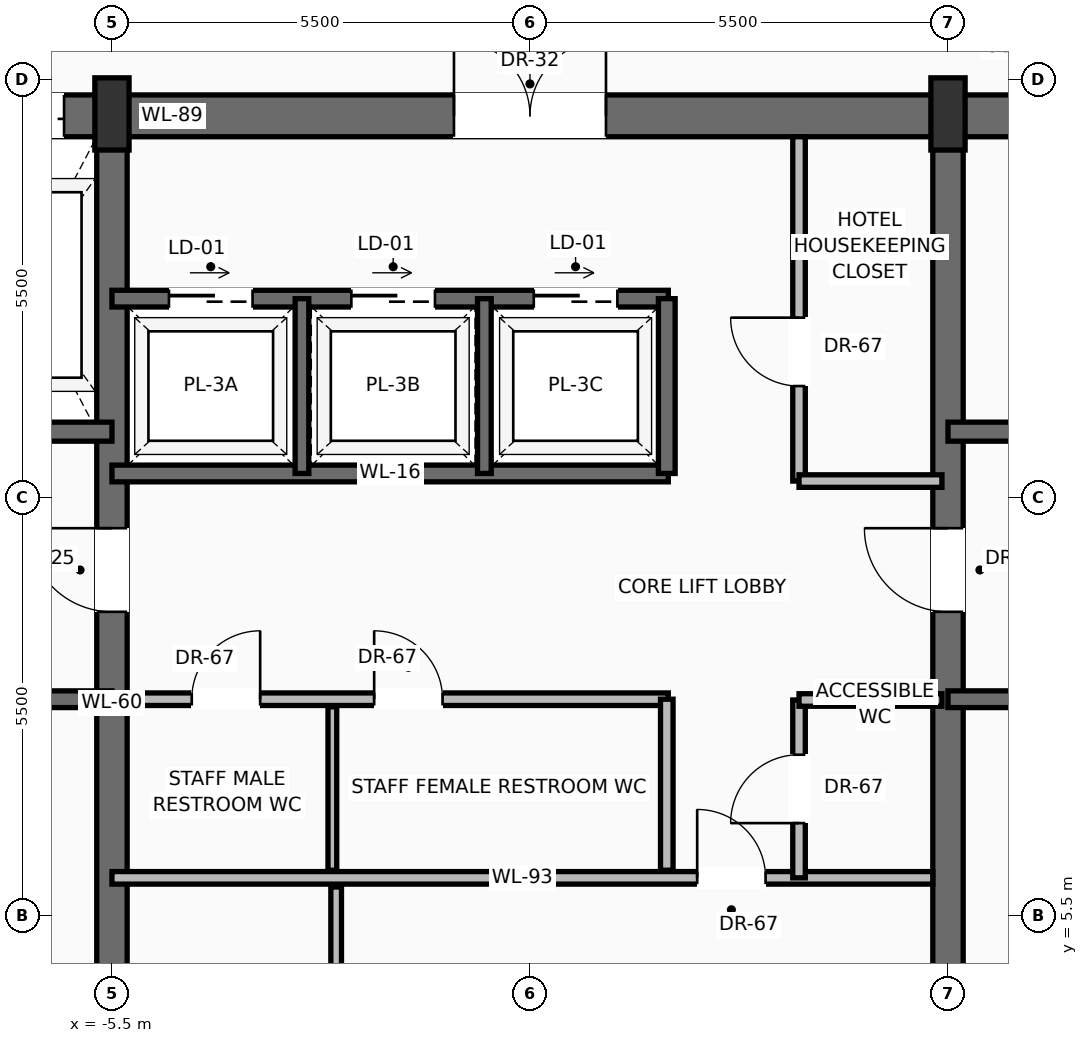
"""IFC4 building model, lengths in metres.
Left out: names, types, materials, properties, quantities, classifications, styles, units other than length and angle.
Written with IfcOpenShell. Run it as: python <this file> out.ifc"""

import sys

from ifc_helpers import new_model, si_unit, direction, frame, frame_2d, origin, origin_2d, place, context, subcontext, project, spatial, rectangle, extrude, source, transform, mapped, element, fill, save


model = new_model("IFC4")
c1 = context("Model", 3, precision=1e-05, world=origin(), true_north=direction((0.0, 1.0)))
c2 = subcontext(c1, "Body", "Model", "MODEL_VIEW")
j1 = project(units=[si_unit("LENGTHUNIT", "METRE"), si_unit("PLANEANGLEUNIT", "RADIAN")], contexts=[c1])
p1 = place(None, origin())
s1 = spatial("IfcSite", under=j1, at=p1, CompositionType="ELEMENT")
p2 = place(p1, origin())
s2 = spatial("IfcBuilding", under=s1, at=p2, CompositionType="ELEMENT")
p3 = place(p2, frame((0.0, 0.0, 233.8)))
s3 = spatial("IfcBuildingStorey", under=s2, at=p3, CompositionType="ELEMENT", Elevation=233.8)
p4 = place(p3, frame((-10.7, 16.025, 0.0), z_axis=(0.0, 0.0, 1.0), x_axis=(1.0, 0.0, 0.0)))
e1 = element("IfcWall", 1, at=p4, inside=s3, PredefinedType="SHEAR", context=c2, shape_type="SweptSolid", body=[
    extrude(rectangle(XDim=21.4, YDim=0.55, at=frame_2d((10.7, 0.0))), origin(), (0.0, 0.0, 1.0), 3.24),
])
p5 = place(p4, frame((3.27, 0.0, 0.0)))
e2 = element("IfcOpeningElement", 2, at=p5, cuts=e1, PredefinedType="OPENING", context=c2, shape_type="SweptSolid", body=[
    extrude(rectangle(XDim=1.3, YDim=2.3, at=frame_2d((0.65, 1.15))), frame((0.0, 0.285, 0.0), z_axis=(0.0, -1.0, 0.0), x_axis=(1.0, 0.0, 0.0)), (0.0, 0.0, 1.0), 0.57),
])
p6 = place(p4, frame((9.7, 0.0, 0.0)))
e3 = element("IfcOpeningElement", 3, at=p6, cuts=e1, PredefinedType="OPENING", context=c2, shape_type="SweptSolid", body=[
    extrude(rectangle(XDim=2.0, YDim=2.4, at=frame_2d((1.0, 1.2))), frame((0.0, 0.285, 0.0), z_axis=(0.0, -1.0, 0.0), x_axis=(1.0, 0.0, 0.0)), (0.0, 0.0, 1.0), 0.57),
])
p7 = place(p3, frame((-5.5, 0.575, 0.0), z_axis=(0.0, 0.0, 1.0), x_axis=(0.0, 1.0, 0.0)))
e4 = element("IfcWall", 4, at=p7, inside=s3, PredefinedType="SHEAR", context=c2, shape_type="SweptSolid", body=[
    extrude(rectangle(XDim=15.45, YDim=0.4, at=frame_2d((7.725, 0.0))), origin(), (0.0, 0.0, 1.0), 3.24),
])
p8 = place(p7, frame((8.925, 0.0, 0.0)))
e5 = element("IfcOpeningElement", 5, at=p8, cuts=e4, PredefinedType="OPENING", context=c2, shape_type="SweptSolid", body=[
    extrude(rectangle(XDim=1.1, YDim=2.2, at=frame_2d((0.55, 1.1))), frame((0.0, 0.21, 0.0), z_axis=(0.0, -1.0, 0.0), x_axis=(1.0, 0.0, 0.0)), (0.0, 0.0, 1.0), 0.42),
])
p9 = place(p3, frame((5.5, 0.575, 0.0), z_axis=(0.0, 0.0, 1.0), x_axis=(0.0, 1.0, 0.0)))
e6 = element("IfcWall", 6, at=p9, inside=s3, PredefinedType="SHEAR", context=c2, shape_type="SweptSolid", body=[
    extrude(rectangle(XDim=15.45, YDim=0.4, at=frame_2d((7.725, 0.0))), origin(), (0.0, 0.0, 1.0), 3.24),
])
p10 = place(p9, frame((8.925, 0.0, 0.0)))
e7 = element("IfcOpeningElement", 7, at=p10, cuts=e6, PredefinedType="OPENING", context=c2, shape_type="SweptSolid", body=[
    extrude(rectangle(XDim=1.1, YDim=2.2, at=frame_2d((0.55, 1.1))), frame((0.0, 0.21, 0.0), z_axis=(0.0, -1.0, 0.0), x_axis=(1.0, 0.0, 0.0)), (0.0, 0.0, 1.0), 0.42),
])
m1 = source(origin(), c2, "Body", "SweptSolid", [
    extrude(rectangle(XDim=0.45, YDim=0.95, at=origin_2d()), origin(), (0.0, 0.0, 1.0), 3.45),
])
for number, where, z_axis, x_axis in (
    (8, (-5.5, 16.05, 0.0), (0.0, 0.0, 1.0), (1.0, 0.0, 0.0)),
    (9, (5.5, 16.05, 0.0), (0.0, 0.0, 1.0), (1.0, 0.0, 0.0)),
):
    element("IfcColumn", number, at=place(p3, frame(where, z_axis=z_axis, x_axis=x_axis)), inside=s3, PredefinedType="PILASTER", context=c2, shape_type="MappedRepresentation", body=[
        mapped(m1, transform((0.0, 0.0, 0.0), scale=1.0)),
    ])
p11 = place(p3, frame((-5.5, 8.35, 0.0), z_axis=(0.0, 0.0, 1.0), x_axis=(-1.0, 0.0, 0.0)))
e10 = element("IfcWall", 10, at=p11, inside=s3, PredefinedType="SOLIDWALL", context=c2, shape_type="SweptSolid", body=[
    extrude(rectangle(XDim=4.65, YDim=0.22, at=frame_2d((2.325, 0.0))), origin(), (0.0, 0.0, 1.0), 3.24),
])
p12 = place(p11, frame((2.5, 0.0, 0.0)))
e11 = element("IfcOpeningElement", 11, at=p12, cuts=e10, PredefinedType="OPENING", context=c2, shape_type="SweptSolid", body=[
    extrude(rectangle(XDim=1.15, YDim=2.2, at=frame_2d((0.575, 1.1))), frame((0.0, 0.12, 0.0), z_axis=(0.0, -1.0, 0.0), x_axis=(1.0, 0.0, 0.0)), (0.0, 0.0, 1.0), 0.24),
])
p13 = place(p3, frame((-5.5, 11.87, 0.0), z_axis=(0.0, 0.0, 1.0), x_axis=(-1.0, 0.0, 0.0)))
e12 = element("IfcWall", 12, at=p13, inside=s3, PredefinedType="SOLIDWALL", context=c2, shape_type="SweptSolid", body=[
    extrude(rectangle(XDim=4.65, YDim=0.25, at=frame_2d((2.325, 0.0))), origin(), (0.0, 0.0, 1.0), 3.24),
])
p14 = place(p13, frame((2.95, 0.0, 0.0)))
e13 = element("IfcOpeningElement", 13, at=p14, cuts=e12, PredefinedType="OPENING", context=c2, shape_type="SweptSolid", body=[
    extrude(rectangle(XDim=1.2, YDim=2.25, at=frame_2d((0.6, 1.125))), frame((0.0, 0.135, 0.0), z_axis=(0.0, -1.0, 0.0), x_axis=(1.0, 0.0, 0.0)), (0.0, 0.0, 1.0), 0.27),
])
p15 = place(p3, frame((10.15, 8.35, 0.0), z_axis=(0.0, 0.0, 1.0), x_axis=(-1.0, 0.0, 0.0)))
e14 = element("IfcWall", 14, at=p15, inside=s3, PredefinedType="SOLIDWALL", context=c2, shape_type="SweptSolid", body=[
    extrude(rectangle(XDim=4.65, YDim=0.22, at=frame_2d((2.325, 0.0))), origin(), (0.0, 0.0, 1.0), 3.24),
])
p16 = place(p15, frame((1.0, 0.0, 0.0)))
e15 = element("IfcOpeningElement", 15, at=p16, cuts=e14, PredefinedType="OPENING", context=c2, shape_type="SweptSolid", body=[
    extrude(rectangle(XDim=1.15, YDim=2.2, at=frame_2d((0.575, 1.1))), frame((0.0, 0.12, 0.0), z_axis=(0.0, -1.0, 0.0), x_axis=(1.0, 0.0, 0.0)), (0.0, 0.0, 1.0), 0.24),
])
p17 = place(p3, frame((10.15, 11.87, 0.0), z_axis=(0.0, 0.0, 1.0), x_axis=(-1.0, 0.0, 0.0)))
e16 = element("IfcWall", 16, at=p17, inside=s3, PredefinedType="SOLIDWALL", context=c2, shape_type="SweptSolid", body=[
    extrude(rectangle(XDim=4.65, YDim=0.25, at=frame_2d((2.325, 0.0))), origin(), (0.0, 0.0, 1.0), 3.24),
])
p18 = place(p17, frame((0.5, 0.0, 0.0)))
e17 = element("IfcOpeningElement", 17, at=p18, cuts=e16, PredefinedType="OPENING", context=c2, shape_type="SweptSolid", body=[
    extrude(rectangle(XDim=1.2, YDim=2.25, at=frame_2d((0.6, 1.125))), frame((0.0, 0.135, 0.0), z_axis=(0.0, -1.0, 0.0), x_axis=(1.0, 0.0, 0.0)), (0.0, 0.0, 1.0), 0.27),
])
p19 = place(p3, frame((-5.5, 6.0, 0.0), z_axis=(0.0, 0.0, 1.0), x_axis=(1.0, 0.0, 0.0)))
e18 = element("IfcWall", 18, at=p19, inside=s3, PredefinedType="PARTITIONING", context=c2, shape_type="SweptSolid", body=[
    extrude(rectangle(XDim=10.8, YDim=0.165, at=frame_2d((5.4, 0.0))), origin(), (0.0, 0.0, 1.0), 3.232),
])
p20 = place(p19, frame((7.7, 0.0, 0.0)))
e19 = element("IfcOpeningElement", 19, at=p20, cuts=e18, PredefinedType="OPENING", context=c2, shape_type="SweptSolid", body=[
    extrude(rectangle(XDim=0.9, YDim=2.1, at=frame_2d((0.45, 1.05))), frame((0.0, 0.093, 0.0), z_axis=(0.0, -1.0, 0.0), x_axis=(1.0, 0.0, 0.0)), (0.0, 0.0, 1.0), 0.185),
])
p21 = place(p3, frame((-2.55, 0.85, 0.0), z_axis=(0.0, 0.0, 1.0), x_axis=(0.0, 1.0, 0.0)))
e20 = element("IfcWall", 20, at=p21, inside=s3, PredefinedType="PARTITIONING", context=c2, shape_type="SweptSolid", body=[
    extrude(rectangle(XDim=5.03, YDim=0.14, at=frame_2d((2.515, 0.0))), origin(), (0.0, 0.0, 1.0), 3.232),
])
p22 = place(p21, frame((2.1, 0.0, 0.0)))
e21 = element("IfcOpeningElement", 21, at=p22, cuts=e20, PredefinedType="OPENING", context=c2, shape_type="SweptSolid", body=[
    extrude(rectangle(XDim=0.9, YDim=2.1, at=frame_2d((0.45, 1.05))), frame((0.0, 0.08, 0.0), z_axis=(0.0, -1.0, 0.0), x_axis=(1.0, 0.0, 0.0)), (0.0, 0.0, 1.0), 0.16),
])
p23 = place(p3, frame((3.54, 6.0, 0.0), z_axis=(0.0, 0.0, 1.0), x_axis=(0.0, 1.0, 0.0)))
e22 = element("IfcWall", 22, at=p23, inside=s3, PredefinedType="PARTITIONING", context=c2, shape_type="SweptSolid", body=[
    extrude(rectangle(XDim=2.34, YDim=0.165, at=frame_2d((1.17, 0.0))), origin(), (0.0, 0.0, 1.0), 3.232),
])
p24 = place(p23, frame((0.72, 0.0, 0.0)))
e23 = element("IfcOpeningElement", 23, at=p24, cuts=e22, PredefinedType="OPENING", context=c2, shape_type="SweptSolid", body=[
    extrude(rectangle(XDim=0.9, YDim=2.1, at=frame_2d((0.45, 1.05))), frame((0.0, 0.093, 0.0), z_axis=(0.0, -1.0, 0.0), x_axis=(1.0, 0.0, 0.0)), (0.0, 0.0, 1.0), 0.185),
])
p25 = place(p3, frame((3.54, 8.34, 0.0), z_axis=(0.0, 0.0, 1.0), x_axis=(1.0, 0.0, 0.0)))
e24 = element("IfcWall", 24, at=p25, inside=s3, PredefinedType="PARTITIONING", context=c2, shape_type="SweptSolid", body=[
    extrude(rectangle(XDim=1.88, YDim=0.165, at=frame_2d((0.94, 0.0))), origin(), (0.0, 0.0, 1.0), 3.232),
])
p26 = place(p3, frame((-5.3, 8.35, 0.0), z_axis=(0.0, 0.0, 1.0), x_axis=(1.0, 0.0, 0.0)))
e25 = element("IfcWall", 25, at=p26, inside=s3, PredefinedType="PARTITIONING", context=c2, shape_type="SweptSolid", body=[
    extrude(rectangle(XDim=7.12, YDim=0.165, at=frame_2d((3.56, 0.0))), origin(), (0.0, 0.0, 1.0), 3.232),
])
p27 = place(p26, frame((0.85, 0.0, 0.0)))
e26 = element("IfcOpeningElement", 26, at=p27, cuts=e25, PredefinedType="OPENING", context=c2, shape_type="SweptSolid", body=[
    extrude(rectangle(XDim=0.9, YDim=2.1, at=frame_2d((0.45, 1.05))), frame((0.0, 0.093, 0.0), z_axis=(0.0, -1.0, 0.0), x_axis=(1.0, 0.0, 0.0)), (0.0, 0.0, 1.0), 0.185),
])
p28 = place(p26, frame((3.25, 0.0, 0.0)))
e27 = element("IfcOpeningElement", 27, at=p28, cuts=e25, PredefinedType="OPENING", context=c2, shape_type="SweptSolid", body=[
    extrude(rectangle(XDim=0.9, YDim=2.1, at=frame_2d((0.45, 1.05))), frame((0.0, 0.093, 0.0), z_axis=(0.0, -1.0, 0.0), x_axis=(1.0, 0.0, 0.0)), (0.0, 0.0, 1.0), 0.185),
])
p29 = place(p3, frame((1.8, 6.1, 0.0), z_axis=(0.0, 0.0, 1.0), x_axis=(0.0, 1.0, 0.0)))
e28 = element("IfcWall", 28, at=p29, inside=s3, PredefinedType="PARTITIONING", context=c2, shape_type="SweptSolid", body=[
    extrude(rectangle(XDim=2.25, YDim=0.165, at=frame_2d((1.125, 0.0))), origin(), (0.0, 0.0, 1.0), 3.232),
])
p30 = place(p3, frame((-2.6, 6.1, 0.0), z_axis=(0.0, 0.0, 1.0), x_axis=(0.0, 1.0, 0.0)))
e29 = element("IfcWall", 29, at=p30, inside=s3, PredefinedType="PARTITIONING", context=c2, shape_type="SweptSolid", body=[
    extrude(rectangle(XDim=2.15, YDim=0.115, at=frame_2d((1.075, 0.0))), origin(), (0.0, 0.0, 1.0), 3.232),
])
p31 = place(p3, frame((-5.5, 11.32, 0.0), z_axis=(0.0, 0.0, 1.0), x_axis=(1.0, 0.0, 0.0)))
e30 = element("IfcWall", 30, at=p31, inside=s3, PredefinedType="SOLIDWALL", context=c2, shape_type="SweptSolid", body=[
    extrude(rectangle(XDim=7.32, YDim=0.22, at=frame_2d((3.66, 0.0))), origin(), (0.0, 0.0, 1.0), 3.24),
])
p32 = place(p3, frame((-5.5, 13.62, 0.0), z_axis=(0.0, 0.0, 1.0), x_axis=(1.0, 0.0, 0.0)))
e31 = element("IfcWall", 31, at=p32, inside=s3, PredefinedType="SOLIDWALL", context=c2, shape_type="SweptSolid", body=[
    extrude(rectangle(XDim=7.32, YDim=0.22, at=frame_2d((3.66, 0.0))), origin(), (0.0, 0.0, 1.0), 3.24),
])
p33 = place(p32, frame((0.75, 0.0, 0.0)))
e32 = element("IfcOpeningElement", 32, at=p33, cuts=e31, PredefinedType="OPENING", context=c2, shape_type="SweptSolid", body=[
    extrude(rectangle(XDim=1.1, YDim=2.2, at=frame_2d((0.55, 1.1))), frame((0.0, 0.12, 0.0), z_axis=(0.0, -1.0, 0.0), x_axis=(1.0, 0.0, 0.0)), (0.0, 0.0, 1.0), 0.24),
])
p34 = place(p32, frame((3.15, 0.0, 0.0)))
e33 = element("IfcOpeningElement", 33, at=p34, cuts=e31, PredefinedType="OPENING", context=c2, shape_type="SweptSolid", body=[
    extrude(rectangle(XDim=1.1, YDim=2.2, at=frame_2d((0.55, 1.1))), frame((0.0, 0.12, 0.0), z_axis=(0.0, -1.0, 0.0), x_axis=(1.0, 0.0, 0.0)), (0.0, 0.0, 1.0), 0.24),
])
p35 = place(p32, frame((5.55, 0.0, 0.0)))
e34 = element("IfcOpeningElement", 34, at=p35, cuts=e31, PredefinedType="OPENING", context=c2, shape_type="SweptSolid", body=[
    extrude(rectangle(XDim=1.1, YDim=2.2, at=frame_2d((0.55, 1.1))), frame((0.0, 0.12, 0.0), z_axis=(0.0, -1.0, 0.0), x_axis=(1.0, 0.0, 0.0)), (0.0, 0.0, 1.0), 0.24),
])
p36 = place(p3, frame((1.8, 11.32, 0.0), z_axis=(0.0, 0.0, 1.0), x_axis=(0.0, 1.0, 0.0)))
e35 = element("IfcWall", 35, at=p36, inside=s3, PredefinedType="SOLIDWALL", context=c2, shape_type="SweptSolid", body=[
    extrude(rectangle(XDim=2.3, YDim=0.22, at=frame_2d((1.15, 0.0))), origin(), (0.0, 0.0, 1.0), 3.24),
])
for number, where, z_axis, x_axis in (
    (36, (-3.0, 11.32, 0.0), (0.0, 0.0, 1.0), (0.0, 1.0, 0.0)),
    (37, (-0.6, 11.32, 0.0), (0.0, 0.0, 1.0), (0.0, 1.0, 0.0)),
):
    element("IfcWall", number, at=place(p3, frame(where, z_axis=z_axis, x_axis=x_axis)), inside=s3, PredefinedType="SOLIDWALL", context=c2, shape_type="SweptSolid", body=[
        extrude(rectangle(XDim=2.3, YDim=0.18, at=frame_2d((1.15, 0.0))), origin(), (0.0, 0.0, 1.0), 3.24),
    ])
p37 = place(p3, frame((3.54, 11.22, 0.0), z_axis=(0.0, 0.0, 1.0), x_axis=(0.0, 1.0, 0.0)))
e38 = element("IfcWall", 38, at=p37, inside=s3, PredefinedType="PARTITIONING", context=c2, shape_type="SweptSolid", body=[
    extrude(rectangle(XDim=4.53, YDim=0.165, at=frame_2d((2.265, 0.0))), origin(), (0.0, 0.0, 1.0), 3.232),
])
p38 = place(p37, frame((1.25, 0.0, 0.0)))
e39 = element("IfcOpeningElement", 39, at=p38, cuts=e38, PredefinedType="OPENING", context=c2, shape_type="SweptSolid", body=[
    extrude(rectangle(XDim=0.9, YDim=2.1, at=frame_2d((0.45, 1.05))), frame((0.0, 0.093, 0.0), z_axis=(0.0, -1.0, 0.0), x_axis=(1.0, 0.0, 0.0)), (0.0, 0.0, 1.0), 0.185),
])
p39 = place(p3, frame((3.54, 11.22, 0.0), z_axis=(0.0, 0.0, 1.0), x_axis=(1.0, 0.0, 0.0)))
e40 = element("IfcWall", 40, at=p39, inside=s3, PredefinedType="PARTITIONING", context=c2, shape_type="SweptSolid", body=[
    extrude(rectangle(XDim=1.88, YDim=0.165, at=frame_2d((0.94, 0.0))), origin(), (0.0, 0.0, 1.0), 3.232),
])
m2 = source(origin(), c2, "Body", "SweptSolid", [
    extrude(rectangle(XDim=1.1, YDim=2.2, at=frame_2d((0.55, 1.1))), frame((0.0, 0.025, 0.0), z_axis=(0.0, -1.0, 0.0), x_axis=(1.0, 0.0, 0.0)), (0.0, 0.0, 1.0), 0.05),
])
p40 = place(p8, origin())
e41 = element("IfcDoor", 41, at=p40, inside=s3, OperationType="SINGLE_SWING_RIGHT", PredefinedType="DOOR", context=c2, shape_type="MappedRepresentation", body=[
    mapped(m2, transform((0.0, 0.0, 0.0), scale=1.0)),
])
fill(e5, e41)
m3 = source(origin(), c2, "Body", "SweptSolid", [
    extrude(rectangle(XDim=1.3, YDim=2.3, at=frame_2d((0.65, 1.15))), frame((0.0, 0.025, 0.0), z_axis=(0.0, -1.0, 0.0), x_axis=(1.0, 0.0, 0.0)), (0.0, 0.0, 1.0), 0.05),
])
p41 = place(p5, origin())
e42 = element("IfcDoor", 42, at=p41, inside=s3, OperationType="SLIDING_TO_RIGHT", PredefinedType="DOOR", context=c2, shape_type="MappedRepresentation", body=[
    mapped(m3, transform((0.0, 0.0, 0.0), scale=1.0)),
])
fill(e2, e42)
p42 = place(p10, origin())
e43 = element("IfcDoor", 43, at=p42, inside=s3, OperationType="SINGLE_SWING_RIGHT", PredefinedType="DOOR", context=c2, shape_type="MappedRepresentation", body=[
    mapped(m2, transform((0.0, 0.0, 0.0), scale=1.0)),
])
fill(e7, e43)
m4 = source(origin(), c2, "Body", "SweptSolid", [
    extrude(rectangle(XDim=2.0, YDim=2.4, at=frame_2d((1.0, 1.2))), frame((0.0, 0.025, 0.0), z_axis=(0.0, -1.0, 0.0), x_axis=(1.0, 0.0, 0.0)), (0.0, 0.0, 1.0), 0.05),
])
p43 = place(p6, origin())
e44 = element("IfcDoor", 44, at=p43, inside=s3, OperationType="DOUBLE_DOOR_SINGLE_SWING", PredefinedType="DOOR", context=c2, shape_type="MappedRepresentation", body=[
    mapped(m4, transform((0.0, 0.0, 0.0), scale=1.0)),
])
fill(e3, e44)
m5 = source(origin(), c2, "Body", "SweptSolid", [
    extrude(rectangle(XDim=0.9, YDim=2.1, at=frame_2d((0.45, 1.05))), frame((0.0, 0.025, 0.0), z_axis=(0.0, -1.0, 0.0), x_axis=(1.0, 0.0, 0.0)), (0.0, 0.0, 1.0), 0.05),
])
p44 = place(p20, origin())
e45 = element("IfcDoor", 45, at=p44, inside=s3, OperationType="SINGLE_SWING_LEFT", PredefinedType="DOOR", context=c2, shape_type="MappedRepresentation", body=[
    mapped(m5, transform((0.0, 0.0, 0.0), scale=1.0)),
])
fill(e19, e45)
p45 = place(p24, origin())
e46 = element("IfcDoor", 46, at=p45, inside=s3, OperationType="SINGLE_SWING_LEFT", PredefinedType="DOOR", context=c2, shape_type="MappedRepresentation", body=[
    mapped(m5, transform((0.0, 0.0, 0.0), scale=1.0)),
])
fill(e23, e46)
p46 = place(p27, origin())
e47 = element("IfcDoor", 47, at=p46, inside=s3, OperationType="SINGLE_SWING_RIGHT", PredefinedType="DOOR", context=c2, shape_type="MappedRepresentation", body=[
    mapped(m5, transform((0.0, 0.0, 0.0), scale=1.0)),
])
fill(e26, e47)
p47 = place(p28, origin())
e48 = element("IfcDoor", 48, at=p47, inside=s3, OperationType="SINGLE_SWING_LEFT", PredefinedType="DOOR", context=c2, shape_type="MappedRepresentation", body=[
    mapped(m5, transform((0.0, 0.0, 0.0), scale=1.0)),
])
fill(e27, e48)
m6 = source(origin(), c2, "Body", "SweptSolid", [
    extrude(rectangle(XDim=1.1, YDim=2.2, at=frame_2d((0.55, 1.1))), frame((0.0, 0.025, 0.0), z_axis=(0.0, -1.0, 0.0), x_axis=(1.0, 0.0, 0.0)), (0.0, 0.0, 1.0), 0.05),
])
p48 = place(p33, origin())
e49 = element("IfcDoor", 49, at=p48, inside=s3, OperationType="SLIDING_TO_RIGHT", PredefinedType="DOOR", context=c2, shape_type="MappedRepresentation", body=[
    mapped(m6, transform((0.0, 0.0, 0.0), scale=1.0)),
])
fill(e32, e49)
p49 = place(p34, origin())
e50 = element("IfcDoor", 50, at=p49, inside=s3, OperationType="SLIDING_TO_RIGHT", PredefinedType="DOOR", context=c2, shape_type="MappedRepresentation", body=[
    mapped(m6, transform((0.0, 0.0, 0.0), scale=1.0)),
])
fill(e33, e50)
p50 = place(p35, origin())
e51 = element("IfcDoor", 51, at=p50, inside=s3, OperationType="SLIDING_TO_RIGHT", PredefinedType="DOOR", context=c2, shape_type="MappedRepresentation", body=[
    mapped(m6, transform((0.0, 0.0, 0.0), scale=1.0)),
])
fill(e34, e51)
p51 = place(p38, origin())
e52 = element("IfcDoor", 52, at=p51, inside=s3, OperationType="SINGLE_SWING_RIGHT", PredefinedType="DOOR", context=c2, shape_type="MappedRepresentation", body=[
    mapped(m5, transform((0.0, 0.0, 0.0), scale=1.0)),
])
fill(e39, e52)
save(model, sys.argv[1])
